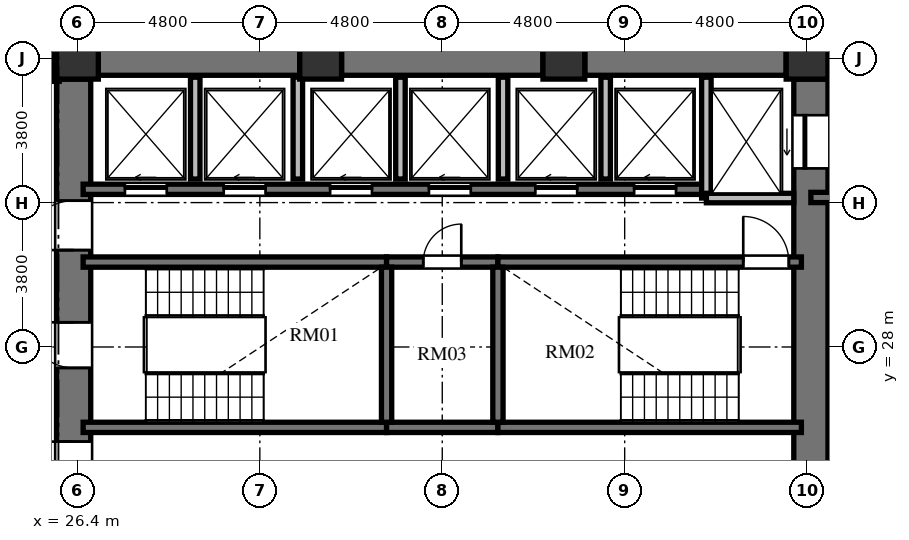
"""IFC4 building model, lengths in metres.
Left out: names, types, materials, properties, quantities, classifications, styles, units other than length and angle.
Written with IfcOpenShell. Run it as: python <this file> out.ifc"""

import sys

from ifc_helpers import new_model, si_unit, direction, frame, frame_2d, origin, origin_2d, place, context, subcontext, project, spatial, rectangle, extrude, element, fill, save


model = new_model("IFC4")
c1 = context("Model", 3, precision=1e-05, world=origin(), true_north=direction((0.0, 1.0)))
c2 = subcontext(c1, "Body", "Model", "MODEL_VIEW")
j1 = project(units=[si_unit("LENGTHUNIT", "METRE"), si_unit("PLANEANGLEUNIT", "RADIAN")], contexts=[c1])
p1 = place(None, origin())
s1 = spatial("IfcSite", under=j1, at=p1, CompositionType="ELEMENT")
p2 = place(p1, origin())
s2 = spatial("IfcBuilding", under=s1, at=p2, CompositionType="ELEMENT")
p3 = place(p2, frame((0.0, 0.0, 28.848)))
s3 = spatial("IfcBuildingStorey", under=s2, at=p3, CompositionType="ELEMENT", Elevation=28.848)
for number, where, z_axis, x_axis in (
    (1, (45.6, 35.6, 0.0), (0.0, 0.0, 1.0), (1.0, 0.0, 0.0)),
    (2, (39.2, 35.6, 0.0), (0.0, 0.0, 1.0), (1.0, 0.0, 0.0)),
    (3, (32.8, 35.6, 0.0), (0.0, 0.0, 1.0), (1.0, 0.0, 0.0)),
    (4, (26.4, 35.6, 0.0), (0.0, 0.0, 1.0), (1.0, 0.0, 0.0)),
):
    element("IfcColumn", number, at=place(p3, frame(where, z_axis=z_axis, x_axis=x_axis)), inside=s3, PredefinedType="COLUMN", context=c2, shape_type="SweptSolid", body=[
        extrude(rectangle(XDim=1.1, YDim=1.1, at=origin_2d()), origin(), (0.0, 0.0, 1.0), 3.648),
    ])
p4 = place(p3, frame((26.3, 20.95, 0.0), z_axis=(0.0, 0.0, 1.0), x_axis=(0.0, 1.0, 0.0)))
e5 = element("IfcWall", 5, at=p4, inside=s3, PredefinedType="SHEAR", context=c2, shape_type="SweptSolid", body=[
    extrude(rectangle(XDim=14.1, YDim=0.9, at=frame_2d((7.05, 0.0))), origin(), (0.0, 0.0, 1.0), 3.648),
])
p5 = place(p4, frame((6.5, 0.0, 0.0)))
e6 = element("IfcOpeningElement", 6, at=p5, cuts=e5, PredefinedType="OPENING", context=c2, shape_type="SweptSolid", body=[
    extrude(rectangle(XDim=1.2, YDim=2.15, at=frame_2d((0.6, 1.075))), frame((0.0, 0.46, 0.0), z_axis=(0.0, -1.0, 0.0), x_axis=(1.0, 0.0, 0.0)), (0.0, 0.0, 1.0), 0.92),
])
p6 = place(p4, frame((9.6, 0.0, 0.0)))
e7 = element("IfcOpeningElement", 7, at=p6, cuts=e5, PredefinedType="OPENING", context=c2, shape_type="SweptSolid", body=[
    extrude(rectangle(XDim=1.3, YDim=2.2, at=frame_2d((0.65, 1.1))), frame((0.0, 0.46, 0.0), z_axis=(0.0, -1.0, 0.0), x_axis=(1.0, 0.0, 0.0)), (0.0, 0.0, 1.0), 0.92),
])
p7 = place(p4, frame((3.26, 0.0, 0.0)))
e8 = element("IfcOpeningElement", 8, at=p7, cuts=e5, PredefinedType="OPENING", context=c2, shape_type="SweptSolid", body=[
    extrude(rectangle(XDim=1.3, YDim=2.2, at=frame_2d((0.65, 1.1))), frame((0.0, 0.46, 0.0), z_axis=(0.0, -1.0, 0.0), x_axis=(1.0, 0.0, 0.0)), (0.0, 0.0, 1.0), 0.92),
])
p8 = place(p3, frame((45.7, 20.95, 0.0), z_axis=(0.0, 0.0, 1.0), x_axis=(0.0, 1.0, 0.0)))
e9 = element("IfcWall", 9, at=p8, inside=s3, PredefinedType="SHEAR", context=c2, shape_type="SweptSolid", body=[
    extrude(rectangle(XDim=14.1, YDim=0.9, at=frame_2d((7.05, 0.0))), origin(), (0.0, 0.0, 1.0), 3.648),
])
p9 = place(p8, frame((11.75, 0.0, 0.0)))
e10 = element("IfcOpeningElement", 10, at=p9, cuts=e9, PredefinedType="OPENING", context=c2, shape_type="SweptSolid", body=[
    extrude(rectangle(XDim=1.4, YDim=2.3, at=frame_2d((0.7, 1.15))), frame((0.0, 0.46, 0.0), z_axis=(0.0, -1.0, 0.0), x_axis=(1.0, 0.0, 0.0)), (0.0, 0.0, 1.0), 0.92),
])
p10 = place(p8, frame((0.95, 0.0, 0.0)))
e11 = element("IfcOpeningElement", 11, at=p10, cuts=e9, PredefinedType="OPENING", context=c2, shape_type="SweptSolid", body=[
    extrude(rectangle(XDim=1.4, YDim=2.3, at=frame_2d((0.7, 1.15))), frame((0.0, 0.46, 0.0), z_axis=(0.0, -1.0, 0.0), x_axis=(1.0, 0.0, 0.0)), (0.0, 0.0, 1.0), 0.92),
])
p11 = place(p3, frame((26.95, 35.6, 0.0), z_axis=(0.0, 0.0, 1.0), x_axis=(1.0, 0.0, 0.0)))
e12 = element("IfcWall", 12, at=p11, inside=s3, PredefinedType="SHEAR", context=c2, shape_type="SweptSolid", body=[
    extrude(rectangle(XDim=5.3, YDim=0.9, at=frame_2d((2.65, 0.0))), origin(), (0.0, 0.0, 1.0), 3.648),
])
p12 = place(p3, frame((33.35, 35.6, 0.0), z_axis=(0.0, 0.0, 1.0), x_axis=(1.0, 0.0, 0.0)))
e13 = element("IfcWall", 13, at=p12, inside=s3, PredefinedType="SHEAR", context=c2, shape_type="SweptSolid", body=[
    extrude(rectangle(XDim=5.3, YDim=0.9, at=frame_2d((2.65, 0.0))), origin(), (0.0, 0.0, 1.0), 3.648),
])
p13 = place(p3, frame((39.75, 35.6, 0.0), z_axis=(0.0, 0.0, 1.0), x_axis=(1.0, 0.0, 0.0)))
e14 = element("IfcWall", 14, at=p13, inside=s3, PredefinedType="SHEAR", context=c2, shape_type="SweptSolid", body=[
    extrude(rectangle(XDim=5.3, YDim=0.9, at=frame_2d((2.65, 0.0))), origin(), (0.0, 0.0, 1.0), 3.648),
])
p14 = place(p3, frame((26.55, 30.235, 0.0), z_axis=(0.0, 0.0, 1.0), x_axis=(1.0, 0.0, 0.0)))
e15 = element("IfcWall", 15, at=p14, inside=s3, PredefinedType="SHEAR", context=c2, shape_type="SweptSolid", body=[
    extrude(rectangle(XDim=7.985, YDim=0.27, at=frame_2d((3.992, 0.0))), origin(), (0.0, 0.0, 1.0), 3.648),
])
p15 = place(p3, frame((34.535, 30.235, 0.0), z_axis=(0.0, 0.0, 1.0), x_axis=(1.0, 0.0, 0.0)))
e16 = element("IfcWall", 16, at=p15, inside=s3, PredefinedType="SHEAR", context=c2, shape_type="SweptSolid", body=[
    extrude(rectangle(XDim=2.93, YDim=0.27, at=frame_2d((1.465, 0.0))), origin(), (0.0, 0.0, 1.0), 3.648),
])
p16 = place(p15, frame((0.965, 0.0, 0.0)))
e17 = element("IfcOpeningElement", 17, at=p16, cuts=e16, PredefinedType="OPENING", context=c2, shape_type="SweptSolid", body=[
    extrude(rectangle(XDim=1.0, YDim=2.1, at=frame_2d((0.5, 1.05))), frame((0.0, 0.145, 0.0), z_axis=(0.0, -1.0, 0.0), x_axis=(1.0, 0.0, 0.0)), (0.0, 0.0, 1.0), 0.29),
])
p17 = place(p3, frame((37.465, 30.235, 0.0), z_axis=(0.0, 0.0, 1.0), x_axis=(1.0, 0.0, 0.0)))
e18 = element("IfcWall", 18, at=p17, inside=s3, PredefinedType="SHEAR", context=c2, shape_type="SweptSolid", body=[
    extrude(rectangle(XDim=7.985, YDim=0.27, at=frame_2d((3.992, 0.0))), origin(), (0.0, 0.0, 1.0), 3.648),
])
p18 = place(p17, frame((6.455, 0.0, 0.0)))
e19 = element("IfcOpeningElement", 19, at=p18, cuts=e18, PredefinedType="OPENING", context=c2, shape_type="SweptSolid", body=[
    extrude(rectangle(XDim=1.2, YDim=2.15, at=frame_2d((0.6, 1.075))), frame((0.0, 0.145, 0.0), z_axis=(0.0, -1.0, 0.0), x_axis=(1.0, 0.0, 0.0)), (0.0, 0.0, 1.0), 0.29),
])
p19 = place(p3, frame((26.55, 25.885, 0.0), z_axis=(0.0, 0.0, 1.0), x_axis=(1.0, 0.0, 0.0)))
e20 = element("IfcWall", 20, at=p19, inside=s3, PredefinedType="SHEAR", context=c2, shape_type="SweptSolid", body=[
    extrude(rectangle(XDim=7.985, YDim=0.27, at=frame_2d((3.992, 0.0))), origin(), (0.0, 0.0, 1.0), 3.648),
])
p20 = place(p3, frame((34.535, 25.885, 0.0), z_axis=(0.0, 0.0, 1.0), x_axis=(1.0, 0.0, 0.0)))
e21 = element("IfcWall", 21, at=p20, inside=s3, PredefinedType="SHEAR", context=c2, shape_type="SweptSolid", body=[
    extrude(rectangle(XDim=2.93, YDim=0.27, at=frame_2d((1.465, 0.0))), origin(), (0.0, 0.0, 1.0), 3.648),
])
p21 = place(p3, frame((37.465, 25.885, 0.0), z_axis=(0.0, 0.0, 1.0), x_axis=(1.0, 0.0, 0.0)))
e22 = element("IfcWall", 22, at=p21, inside=s3, PredefinedType="SHEAR", context=c2, shape_type="SweptSolid", body=[
    extrude(rectangle(XDim=7.985, YDim=0.27, at=frame_2d((3.992, 0.0))), origin(), (0.0, 0.0, 1.0), 3.648),
])
for number, where, z_axis, x_axis in (
    (23, (34.535, 26.02, 0.0), (0.0, 0.0, 1.0), (0.0, 1.0, 0.0)),
    (24, (37.465, 26.02, 0.0), (0.0, 0.0, 1.0), (0.0, 1.0, 0.0)),
):
    element("IfcWall", number, at=place(p3, frame(where, z_axis=z_axis, x_axis=x_axis)), inside=s3, PredefinedType="SHEAR", context=c2, shape_type="SweptSolid", body=[
        extrude(rectangle(XDim=4.08, YDim=0.27, at=frame_2d((2.04, 0.0))), origin(), (0.0, 0.0, 1.0), 3.648),
    ])
p22 = place(p3, frame((26.55, 32.15, 0.0), z_axis=(0.0, 0.0, 1.0), x_axis=(1.0, 0.0, 0.0)))
e25 = element("IfcWall", 25, at=p22, inside=s3, PredefinedType="SHEAR", context=c2, shape_type="SweptSolid", body=[
    extrude(rectangle(XDim=16.4, YDim=0.27, at=frame_2d((8.2, 0.0))), origin(), (0.0, 0.0, 1.0), 3.648),
])
p23 = place(p22, frame((1.1, 0.0, 0.0)))
e26 = element("IfcOpeningElement", 26, at=p23, cuts=e25, PredefinedType="OPENING", context=c2, shape_type="SweptSolid", body=[
    extrude(rectangle(XDim=1.1, YDim=2.2, at=frame_2d((0.55, 1.1))), frame((0.0, 0.145, 0.0), z_axis=(0.0, -1.0, 0.0), x_axis=(1.0, 0.0, 0.0)), (0.0, 0.0, 1.0), 0.29),
])
p24 = place(p22, frame((3.7, 0.0, 0.0)))
e27 = element("IfcOpeningElement", 27, at=p24, cuts=e25, PredefinedType="OPENING", context=c2, shape_type="SweptSolid", body=[
    extrude(rectangle(XDim=1.1, YDim=2.2, at=frame_2d((0.55, 1.1))), frame((0.0, 0.145, 0.0), z_axis=(0.0, -1.0, 0.0), x_axis=(1.0, 0.0, 0.0)), (0.0, 0.0, 1.0), 0.29),
])
p25 = place(p22, frame((6.5, 0.0, 0.0)))
e28 = element("IfcOpeningElement", 28, at=p25, cuts=e25, PredefinedType="OPENING", context=c2, shape_type="SweptSolid", body=[
    extrude(rectangle(XDim=1.1, YDim=2.2, at=frame_2d((0.55, 1.1))), frame((0.0, 0.145, 0.0), z_axis=(0.0, -1.0, 0.0), x_axis=(1.0, 0.0, 0.0)), (0.0, 0.0, 1.0), 0.29),
])
p26 = place(p22, frame((9.1, 0.0, 0.0)))
e29 = element("IfcOpeningElement", 29, at=p26, cuts=e25, PredefinedType="OPENING", context=c2, shape_type="SweptSolid", body=[
    extrude(rectangle(XDim=1.1, YDim=2.2, at=frame_2d((0.55, 1.1))), frame((0.0, 0.145, 0.0), z_axis=(0.0, -1.0, 0.0), x_axis=(1.0, 0.0, 0.0)), (0.0, 0.0, 1.0), 0.29),
])
p27 = place(p22, frame((11.9, 0.0, 0.0)))
e30 = element("IfcOpeningElement", 30, at=p27, cuts=e25, PredefinedType="OPENING", context=c2, shape_type="SweptSolid", body=[
    extrude(rectangle(XDim=1.1, YDim=2.2, at=frame_2d((0.55, 1.1))), frame((0.0, 0.145, 0.0), z_axis=(0.0, -1.0, 0.0), x_axis=(1.0, 0.0, 0.0)), (0.0, 0.0, 1.0), 0.29),
])
p28 = place(p22, frame((14.5, 0.0, 0.0)))
e31 = element("IfcOpeningElement", 31, at=p28, cuts=e25, PredefinedType="OPENING", context=c2, shape_type="SweptSolid", body=[
    extrude(rectangle(XDim=1.1, YDim=2.2, at=frame_2d((0.55, 1.1))), frame((0.0, 0.145, 0.0), z_axis=(0.0, -1.0, 0.0), x_axis=(1.0, 0.0, 0.0)), (0.0, 0.0, 1.0), 0.29),
])
p29 = place(p3, frame((42.95, 31.92, 0.0), z_axis=(0.0, 0.0, 1.0), x_axis=(0.0, 1.0, 0.0)))
e32 = element("IfcWall", 32, at=p29, inside=s3, PredefinedType="SOLIDWALL", context=c2, shape_type="SweptSolid", body=[
    extrude(rectangle(XDim=3.18, YDim=0.25, at=frame_2d((1.59, 0.0))), origin(), (0.0, 0.0, 1.0), 3.428),
])
p30 = place(p3, frame((42.95, 31.92, 0.0), z_axis=(0.0, 0.0, 1.0), x_axis=(1.0, 0.0, 0.0)))
e33 = element("IfcWall", 33, at=p30, inside=s3, PredefinedType="SOLIDWALL", context=c2, shape_type="SweptSolid", body=[
    extrude(rectangle(XDim=2.3, YDim=0.25, at=frame_2d((1.15, 0.0))), origin(), (0.0, 0.0, 1.0), 3.428),
])
for number, where, z_axis, x_axis in (
    (34, (29.5, 32.42, 0.0), (0.0, 0.0, 1.0), (0.0, 1.0, 0.0)),
    (35, (32.2, 32.42, 0.0), (0.0, 0.0, 1.0), (0.0, 1.0, 0.0)),
    (36, (34.9, 32.42, 0.0), (0.0, 0.0, 1.0), (0.0, 1.0, 0.0)),
    (37, (37.6, 32.42, 0.0), (0.0, 0.0, 1.0), (0.0, 1.0, 0.0)),
    (38, (40.3, 32.42, 0.0), (0.0, 0.0, 1.0), (0.0, 1.0, 0.0)),
):
    element("IfcWall", number, at=place(p3, frame(where, z_axis=z_axis, x_axis=x_axis)), inside=s3, PredefinedType="SOLIDWALL", context=c2, shape_type="SweptSolid", body=[
        extrude(rectangle(XDim=2.68, YDim=0.25, at=frame_2d((1.34, 0.0))), origin(), (0.0, 0.0, 1.0), 3.428),
    ])
p31 = place(p3, frame((45.7, 31.935, 0.0), z_axis=(0.0, 0.0, 1.0), x_axis=(1.0, 0.0, 0.0)))
e39 = element("IfcWall", 39, at=p31, inside=s3, PredefinedType="SHEAR", context=c2, shape_type="SweptSolid", body=[
    extrude(rectangle(XDim=4.715, YDim=0.27, at=frame_2d((2.357, 0.0))), origin(), (0.0, 0.0, 1.0), 3.648),
])
p32 = place(p3, frame((25.83, 36.21, 0.0), z_axis=(0.0, 0.0, 1.0), x_axis=(0.0, -1.0, 0.0)))
e40 = element("IfcWall", 40, at=p32, inside=s3, PredefinedType="PARTITIONING", context=c2, shape_type="SweptSolid", body=[
    extrude(rectangle(XDim=1.22, YDim=0.18, at=frame_2d((0.61, 0.0))), origin(), (0.0, 0.0, 1.0), 3.428),
])
p33 = place(p5, origin())
e41 = element("IfcDoor", 41, at=p33, inside=s3, OperationType="SINGLE_SWING_RIGHT", PredefinedType="DOOR", context=c2, shape_type="SweptSolid", body=[
    extrude(rectangle(XDim=1.2, YDim=2.15, at=frame_2d((0.6, 1.075))), frame((0.0, 0.025, 0.0), z_axis=(0.0, -1.0, 0.0), x_axis=(1.0, 0.0, 0.0)), (0.0, 0.0, 1.0), 0.05),
])
fill(e6, e41)
p34 = place(p18, origin())
e42 = element("IfcDoor", 42, at=p34, inside=s3, OperationType="SINGLE_SWING_LEFT", PredefinedType="DOOR", context=c2, shape_type="SweptSolid", body=[
    extrude(rectangle(XDim=1.2, YDim=2.15, at=frame_2d((0.6, 1.075))), frame((0.0, 0.025, 0.0), z_axis=(0.0, -1.0, 0.0), x_axis=(1.0, 0.0, 0.0)), (0.0, 0.0, 1.0), 0.05),
])
fill(e19, e42)
p35 = place(p16, origin())
e43 = element("IfcDoor", 43, at=p35, inside=s3, OperationType="SINGLE_SWING_RIGHT", PredefinedType="DOOR", context=c2, shape_type="SweptSolid", body=[
    extrude(rectangle(XDim=1.0, YDim=2.1, at=frame_2d((0.5, 1.05))), frame((0.0, 0.025, 0.0), z_axis=(0.0, -1.0, 0.0), x_axis=(1.0, 0.0, 0.0)), (0.0, 0.0, 1.0), 0.05),
])
fill(e17, e43)
p36 = place(p6, origin())
e44 = element("IfcDoor", 44, at=p36, inside=s3, OperationType="SINGLE_SWING_LEFT", PredefinedType="DOOR", context=c2, shape_type="SweptSolid", body=[
    extrude(rectangle(XDim=1.3, YDim=2.2, at=frame_2d((0.65, 1.1))), frame((0.0, 0.025, 0.0), z_axis=(0.0, -1.0, 0.0), x_axis=(1.0, 0.0, 0.0)), (0.0, 0.0, 1.0), 0.05),
])
fill(e7, e44)
p37 = place(p7, origin())
e45 = element("IfcDoor", 45, at=p37, inside=s3, OperationType="SINGLE_SWING_RIGHT", PredefinedType="DOOR", context=c2, shape_type="SweptSolid", body=[
    extrude(rectangle(XDim=1.3, YDim=2.2, at=frame_2d((0.65, 1.1))), frame((0.0, 0.025, 0.0), z_axis=(0.0, -1.0, 0.0), x_axis=(1.0, 0.0, 0.0)), (0.0, 0.0, 1.0), 0.05),
])
fill(e8, e45)
p38 = place(p23, origin())
e46 = element("IfcDoor", 46, at=p38, inside=s3, OperationType="SLIDING_TO_LEFT", PredefinedType="DOOR", context=c2, shape_type="SweptSolid", body=[
    extrude(rectangle(XDim=1.1, YDim=2.2, at=frame_2d((0.55, 1.1))), frame((0.0, 0.025, 0.0), z_axis=(0.0, -1.0, 0.0), x_axis=(1.0, 0.0, 0.0)), (0.0, 0.0, 1.0), 0.05),
])
fill(e26, e46)
p39 = place(p24, origin())
e47 = element("IfcDoor", 47, at=p39, inside=s3, OperationType="SLIDING_TO_LEFT", PredefinedType="DOOR", context=c2, shape_type="SweptSolid", body=[
    extrude(rectangle(XDim=1.1, YDim=2.2, at=frame_2d((0.55, 1.1))), frame((0.0, 0.025, 0.0), z_axis=(0.0, -1.0, 0.0), x_axis=(1.0, 0.0, 0.0)), (0.0, 0.0, 1.0), 0.05),
])
fill(e27, e47)
p40 = place(p25, origin())
e48 = element("IfcDoor", 48, at=p40, inside=s3, OperationType="SLIDING_TO_LEFT", PredefinedType="DOOR", context=c2, shape_type="SweptSolid", body=[
    extrude(rectangle(XDim=1.1, YDim=2.2, at=frame_2d((0.55, 1.1))), frame((0.0, 0.025, 0.0), z_axis=(0.0, -1.0, 0.0), x_axis=(1.0, 0.0, 0.0)), (0.0, 0.0, 1.0), 0.05),
])
fill(e28, e48)
p41 = place(p26, origin())
e49 = element("IfcDoor", 49, at=p41, inside=s3, OperationType="SLIDING_TO_LEFT", PredefinedType="DOOR", context=c2, shape_type="SweptSolid", body=[
    extrude(rectangle(XDim=1.1, YDim=2.2, at=frame_2d((0.55, 1.1))), frame((0.0, 0.025, 0.0), z_axis=(0.0, -1.0, 0.0), x_axis=(1.0, 0.0, 0.0)), (0.0, 0.0, 1.0), 0.05),
])
fill(e29, e49)
p42 = place(p27, origin())
e50 = element("IfcDoor", 50, at=p42, inside=s3, OperationType="SLIDING_TO_LEFT", PredefinedType="DOOR", context=c2, shape_type="SweptSolid", body=[
    extrude(rectangle(XDim=1.1, YDim=2.2, at=frame_2d((0.55, 1.1))), frame((0.0, 0.025, 0.0), z_axis=(0.0, -1.0, 0.0), x_axis=(1.0, 0.0, 0.0)), (0.0, 0.0, 1.0), 0.05),
])
fill(e30, e50)
p43 = place(p28, origin())
e51 = element("IfcDoor", 51, at=p43, inside=s3, OperationType="SLIDING_TO_LEFT", PredefinedType="DOOR", context=c2, shape_type="SweptSolid", body=[
    extrude(rectangle(XDim=1.1, YDim=2.2, at=frame_2d((0.55, 1.1))), frame((0.0, 0.025, 0.0), z_axis=(0.0, -1.0, 0.0), x_axis=(1.0, 0.0, 0.0)), (0.0, 0.0, 1.0), 0.05),
])
fill(e31, e51)
p44 = place(p9, origin())
e52 = element("IfcDoor", 52, at=p44, inside=s3, OperationType="SLIDING_TO_LEFT", PredefinedType="DOOR", context=c2, shape_type="SweptSolid", body=[
    extrude(rectangle(XDim=1.4, YDim=2.3, at=frame_2d((0.7, 1.15))), frame((0.0, 0.025, 0.0), z_axis=(0.0, -1.0, 0.0), x_axis=(1.0, 0.0, 0.0)), (0.0, 0.0, 1.0), 0.05),
])
fill(e10, e52)
save(model, sys.argv[1])
